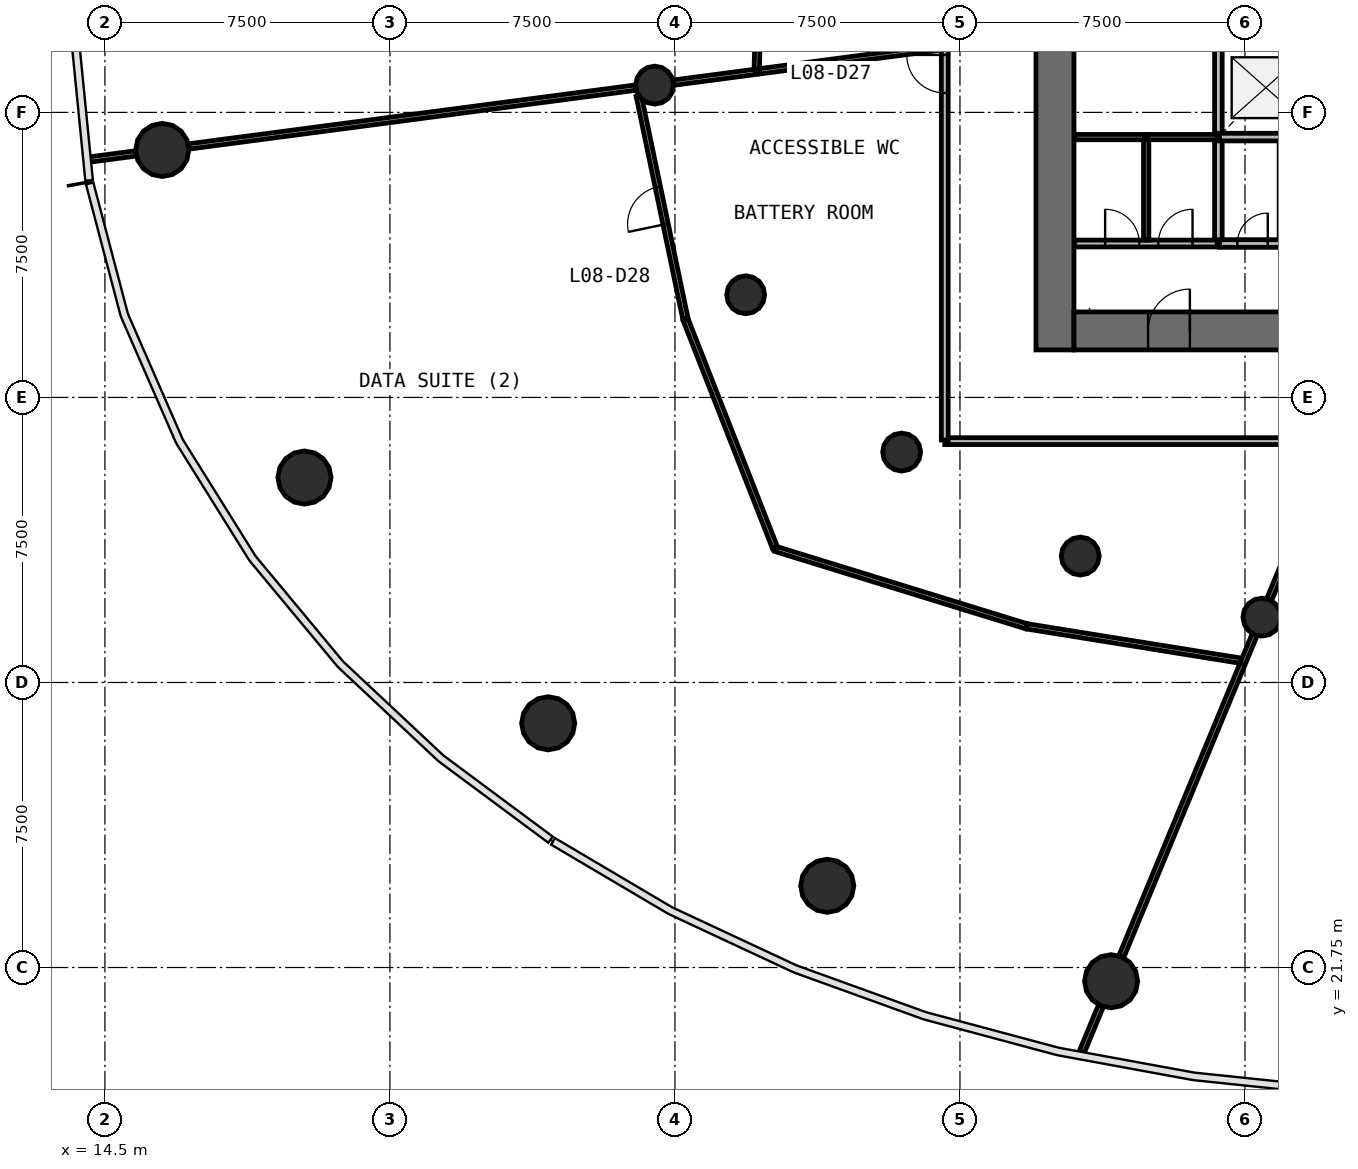
"""IFC4 building model, lengths in metres.
Left out: names, types, materials, properties, quantities, classifications, styles, units other than length and angle.
Written with IfcOpenShell. Run it as: python <this file> out.ifc"""

import sys

from ifc_helpers import new_model, si_unit, direction, frame, frame_2d, origin, origin_2d, place, context, subcontext, project, spatial, rectangle, circle, extrude, source, transform, mapped, element, fill, save


model = new_model("IFC4")
c1 = context("Model", 3, precision=1e-05, world=origin(), true_north=direction((0.0, 1.0)))
c2 = subcontext(c1, "Body", "Model", "MODEL_VIEW")
j1 = project(units=[si_unit("LENGTHUNIT", "METRE"), si_unit("PLANEANGLEUNIT", "RADIAN")], contexts=[c1])
p1 = place(None, origin())
s1 = spatial("IfcSite", under=j1, at=p1, CompositionType="ELEMENT")
p2 = place(p1, origin())
s2 = spatial("IfcBuilding", under=s1, at=p2, CompositionType="ELEMENT")
p3 = place(p2, frame((0.0, 0.0, 35.8)))
s3 = spatial("IfcBuildingStorey", under=s2, at=p3, CompositionType="ELEMENT", Elevation=35.8)
p4 = place(p3, frame((39.5, 58.0, 0.0), z_axis=(0.0, 0.0, 1.0), x_axis=(0.0, -1.0, 0.0)))
e1 = element("IfcWall", 1, at=p4, inside=s3, PredefinedType="SHEAR", context=c2, shape_type="SweptSolid", body=[
    extrude(rectangle(XDim=20.0, YDim=1.0, at=frame_2d((10.0, 0.0))), origin(), (0.0, 0.0, 1.0), 4.4),
])
p5 = place(p4, frame((9.1, 0.0, 0.0)))
e2 = element("IfcOpeningElement", 2, at=p5, cuts=e1, PredefinedType="OPENING", context=c2, shape_type="SweptSolid", body=[
    extrude(rectangle(XDim=1.8, YDim=2.1, at=frame_2d((0.9, 1.05))), frame((0.0, 0.51, 0.0), z_axis=(0.0, -1.0, 0.0), x_axis=(1.0, 0.0, 0.0)), (0.0, 0.0, 1.0), 1.02),
])
p6 = place(p3, frame((40.0, 38.5, 0.0), z_axis=(0.0, 0.0, 1.0), x_axis=(1.0, 0.0, 0.0)))
e3 = element("IfcWall", 3, at=p6, inside=s3, PredefinedType="SHEAR", context=c2, shape_type="SweptSolid", body=[
    extrude(rectangle(XDim=24.0, YDim=1.0, at=frame_2d((12.0, 0.0))), origin(), (0.0, 0.0, 1.0), 4.4),
])
p7 = place(p6, frame((21.45, 0.0, 0.0)))
e4 = element("IfcOpeningElement", 4, at=p7, cuts=e3, PredefinedType="OPENING", context=c2, shape_type="SweptSolid", body=[
    extrude(rectangle(XDim=1.1, YDim=2.1, at=frame_2d((0.55, 1.05))), frame((0.0, 0.51, 0.0), z_axis=(0.0, -1.0, 0.0), x_axis=(1.0, 0.0, 0.0)), (0.0, 0.0, 1.0), 1.02),
])
p8 = place(p6, frame((1.95, 0.0, 0.0)))
e5 = element("IfcOpeningElement", 5, at=p8, cuts=e3, PredefinedType="OPENING", context=c2, shape_type="SweptSolid", body=[
    extrude(rectangle(XDim=1.1, YDim=2.1, at=frame_2d((0.55, 1.05))), frame((0.0, 0.51, 0.0), z_axis=(0.0, -1.0, 0.0), x_axis=(1.0, 0.0, 0.0)), (0.0, 0.0, 1.0), 1.02),
])
m1 = source(origin(), c2, "Body", "SweptSolid", [
    extrude(circle(Radius=0.7, at=origin_2d()), origin(), (0.0, 0.0, 1.0), 4.4),
])
for number, where, z_axis, x_axis in (
    (6, (16.01, 43.262, 0.0), (0.0, 0.0, 1.0), (1.0, 0.0, 0.0)),
    (7, (19.751, 34.642, 0.0), (0.0, 0.0, 1.0), (1.0, 0.0, 0.0)),
    (8, (26.164, 28.176, 0.0), (0.0, 0.0, 1.0), (1.0, 0.0, 0.0)),
    (9, (33.508, 23.9, 0.0), (0.0, 0.0, 1.0), (1.0, 0.0, 0.0)),
    (10, (40.977, 21.389, 0.0), (0.0, 0.0, 1.0), (1.0, 0.0, 0.0)),
):
    element("IfcColumn", number, at=place(p3, frame(where, z_axis=z_axis, x_axis=x_axis)), inside=s3, PredefinedType="COLUMN", context=c2, shape_type="MappedRepresentation", body=[
        mapped(m1, transform((0.0, 0.0, 0.0), scale=1.0)),
    ])
m2 = source(origin(), c2, "Body", "SweptSolid", [
    extrude(circle(Radius=0.5, at=origin_2d()), origin(), (0.0, 0.0, 1.0), 4.4),
])
for number, where, z_axis, x_axis in (
    (11, (28.966, 44.968, 0.0), (0.0, 0.0, 1.0), (1.0, 0.0, 0.0)),
    (12, (31.361, 39.451, 0.0), (0.0, 0.0, 1.0), (1.0, 0.0, 0.0)),
    (13, (35.465, 35.312, 0.0), (0.0, 0.0, 1.0), (1.0, 0.0, 0.0)),
    (14, (40.165, 32.576, 0.0), (0.0, 0.0, 1.0), (1.0, 0.0, 0.0)),
    (15, (44.945, 30.969, 0.0), (0.0, 0.0, 1.0), (1.0, 0.0, 0.0)),
):
    element("IfcColumn", number, at=place(p3, frame(where, z_axis=z_axis, x_axis=x_axis)), inside=s3, PredefinedType="COLUMN", context=c2, shape_type="MappedRepresentation", body=[
        mapped(m2, transform((0.0, 0.0, 0.0), scale=1.0)),
    ])
p9 = place(p3, frame((43.8, 43.6, 0.0), z_axis=(0.0, 0.0, 1.0), x_axis=(0.0, -1.0, 0.0)))
e16 = element("IfcWall", 16, at=p9, inside=s3, PredefinedType="SOLIDWALL", context=c2, shape_type="SweptSolid", body=[
    extrude(rectangle(XDim=2.8, YDim=0.2, at=frame_2d((1.4, 0.0))), origin(), (0.0, 0.0, 1.0), 3.95),
])
p10 = place(p3, frame((43.8, 45.99, 0.0), z_axis=(0.0, 0.0, 1.0), x_axis=(0.0, -1.0, 0.0)))
e17 = element("IfcWall", 17, at=p10, inside=s3, PredefinedType="SOLIDWALL", context=c2, shape_type="SweptSolid", body=[
    extrude(rectangle(XDim=2.36, YDim=0.2, at=frame_2d((1.18, 0.0))), origin(), (0.0, 0.0, 1.0), 3.95),
])
p11 = place(p3, frame((43.83, 43.6, 0.0), z_axis=(0.0, 0.0, 1.0), x_axis=(1.0, 0.0, 0.0)))
e18 = element("IfcWall", 18, at=p11, inside=s3, PredefinedType="SOLIDWALL", context=c2, shape_type="SweptSolid", body=[
    extrude(rectangle(XDim=1.64, YDim=0.2, at=frame_2d((0.82, 0.0))), origin(), (0.0, 0.0, 1.0), 3.95),
])
p12 = place(p3, frame((43.83, 40.8, 0.0), z_axis=(0.0, 0.0, 1.0), x_axis=(1.0, 0.0, 0.0)))
e19 = element("IfcWall", 19, at=p12, inside=s3, PredefinedType="SOLIDWALL", context=c2, shape_type="SweptSolid", body=[
    extrude(rectangle(XDim=1.64, YDim=0.2, at=frame_2d((0.82, 0.0))), origin(), (0.0, 0.0, 1.0), 3.95),
])
p13 = place(p12, frame((0.47, 0.0, 0.0)))
e20 = element("IfcOpeningElement", 20, at=p13, cuts=e19, PredefinedType="OPENING", context=c2, shape_type="SweptSolid", body=[
    extrude(rectangle(XDim=0.8, YDim=2.1, at=frame_2d((0.4, 1.05))), frame((0.0, 0.11, 0.0), z_axis=(0.0, -1.0, 0.0), x_axis=(1.0, 0.0, 0.0)), (0.0, 0.0, 1.0), 0.22),
])
p14 = place(p3, frame((67.4, 35.6, 0.0), z_axis=(0.0, 0.0, 1.0), x_axis=(-1.0, 0.0, 0.0)))
e21 = element("IfcWall", 21, at=p14, inside=s3, PredefinedType="PARTITIONING", context=c2, shape_type="SweptSolid", body=[
    extrude(rectangle(XDim=30.8, YDim=0.18, at=frame_2d((15.4, 0.0))), origin(), (0.0, 0.0, 1.0), 3.05),
])
p15 = place(p14, frame((14.95, 0.0, 0.0)))
e22 = element("IfcOpeningElement", 22, at=p15, cuts=e21, PredefinedType="OPENING", context=c2, shape_type="SweptSolid", body=[
    extrude(rectangle(XDim=1.0, YDim=2.1, at=frame_2d((0.5, 1.05))), frame((0.0, 0.1, 0.0), z_axis=(0.0, -1.0, 0.0), x_axis=(1.0, 0.0, 0.0)), (0.0, 0.0, 1.0), 0.2),
])
p16 = place(p14, frame((12.55, 0.0, 0.0)))
e23 = element("IfcOpeningElement", 23, at=p16, cuts=e21, PredefinedType="OPENING", context=c2, shape_type="SweptSolid", body=[
    extrude(rectangle(XDim=1.0, YDim=2.1, at=frame_2d((0.5, 1.05))), frame((0.0, 0.1, 0.0), z_axis=(0.0, -1.0, 0.0), x_axis=(1.0, 0.0, 0.0)), (0.0, 0.0, 1.0), 0.2),
])
p17 = place(p3, frame((36.6, 35.63, 0.0), z_axis=(0.0, 0.0, 1.0), x_axis=(0.0, 1.0, 0.0)))
e24 = element("IfcWall", 24, at=p17, inside=s3, PredefinedType="PARTITIONING", context=c2, shape_type="SweptSolid", body=[
    extrude(rectangle(XDim=23.583, YDim=0.18, at=frame_2d((11.791, 0.0))), origin(), (0.0, 0.0, 1.0), 3.05),
])
p18 = place(p17, frame((16.032, 0.0, 0.0)))
e25 = element("IfcOpeningElement", 25, at=p18, cuts=e24, PredefinedType="OPENING", context=c2, shape_type="SweptSolid", body=[
    extrude(rectangle(XDim=0.9, YDim=2.1, at=frame_2d((0.45, 1.05))), frame((0.0, 0.1, 0.0), z_axis=(0.0, -1.0, 0.0), x_axis=(1.0, 0.0, 0.0)), (0.0, 0.0, 1.0), 0.2),
])
p19 = place(p17, frame((13.232, 0.0, 0.0)))
e26 = element("IfcOpeningElement", 26, at=p19, cuts=e24, PredefinedType="OPENING", context=c2, shape_type="SweptSolid", body=[
    extrude(rectangle(XDim=0.9, YDim=2.1, at=frame_2d((0.45, 1.05))), frame((0.0, 0.1, 0.0), z_axis=(0.0, -1.0, 0.0), x_axis=(1.0, 0.0, 0.0)), (0.0, 0.0, 1.0), 0.2),
])
p20 = place(p17, frame((11.433, 0.0, 0.0)))
e27 = element("IfcOpeningElement", 27, at=p20, cuts=e24, PredefinedType="OPENING", context=c2, shape_type="SweptSolid", body=[
    extrude(rectangle(XDim=0.9, YDim=2.1, at=frame_2d((0.45, 1.05))), frame((0.0, 0.1, 0.0), z_axis=(0.0, -1.0, 0.0), x_axis=(1.0, 0.0, 0.0)), (0.0, 0.0, 1.0), 0.2),
])
p21 = place(p17, frame((9.133, 0.0, 0.0)))
e28 = element("IfcOpeningElement", 28, at=p21, cuts=e24, PredefinedType="OPENING", context=c2, shape_type="SweptSolid", body=[
    extrude(rectangle(XDim=1.0, YDim=2.1, at=frame_2d((0.5, 1.05))), frame((0.0, 0.1, 0.0), z_axis=(0.0, -1.0, 0.0), x_axis=(1.0, 0.0, 0.0)), (0.0, 0.0, 1.0), 0.2),
])
p22 = place(p17, frame((19.133, 0.0, 0.0)))
e29 = element("IfcOpeningElement", 29, at=p22, cuts=e24, PredefinedType="OPENING", context=c2, shape_type="SweptSolid", body=[
    extrude(rectangle(XDim=1.0, YDim=2.1, at=frame_2d((0.5, 1.05))), frame((0.0, 0.1, 0.0), z_axis=(0.0, -1.0, 0.0), x_axis=(1.0, 0.0, 0.0)), (0.0, 0.0, 1.0), 0.2),
])
p23 = place(p3, frame((40.02, 40.8, 0.0), z_axis=(0.0, 0.0, 1.0), x_axis=(1.0, 0.0, 0.0)))
e30 = element("IfcWall", 30, at=p23, inside=s3, PredefinedType="PARTITIONING", context=c2, shape_type="SweptSolid", body=[
    extrude(rectangle(XDim=3.75, YDim=0.18, at=frame_2d((1.875, 0.0))), origin(), (0.0, 0.0, 1.0), 3.95),
])
p24 = place(p23, frame((0.8, 0.0, 0.0)))
e31 = element("IfcOpeningElement", 31, at=p24, cuts=e30, PredefinedType="OPENING", context=c2, shape_type="SweptSolid", body=[
    extrude(rectangle(XDim=0.9, YDim=2.1, at=frame_2d((0.45, 1.05))), frame((0.0, 0.1, 0.0), z_axis=(0.0, -1.0, 0.0), x_axis=(1.0, 0.0, 0.0)), (0.0, 0.0, 1.0), 0.2),
])
p25 = place(p23, frame((2.2, 0.0, 0.0)))
e32 = element("IfcOpeningElement", 32, at=p25, cuts=e30, PredefinedType="OPENING", context=c2, shape_type="SweptSolid", body=[
    extrude(rectangle(XDim=0.9, YDim=2.1, at=frame_2d((0.45, 1.05))), frame((0.0, 0.1, 0.0), z_axis=(0.0, -1.0, 0.0), x_axis=(1.0, 0.0, 0.0)), (0.0, 0.0, 1.0), 0.2),
])
p26 = place(p3, frame((28.466, 44.902, 0.0), z_axis=(0.0, 0.0, 1.0), x_axis=(-0.991446586451, -0.130513088287, 0.0)))
e33 = element("IfcWall", 33, at=p26, inside=s3, PredefinedType="PARTITIONING", context=c2, shape_type="SweptSolid", body=[
    extrude(rectangle(XDim=11.86, YDim=0.14, at=frame_2d((5.93, 0.0))), origin(), (0.0, 0.0, 1.0), 3.05),
])
p27 = place(p3, frame((41.247, 22.04, 0.0), z_axis=(0.0, 0.0, 1.0), x_axis=(0.382672728165, 0.923883966264, 0.0)))
e34 = element("IfcWall", 34, at=p27, inside=s3, PredefinedType="PARTITIONING", context=c2, shape_type="SweptSolid", body=[
    extrude(rectangle(XDim=9.16, YDim=0.14, at=frame_2d((4.58, 0.0))), origin(), (0.0, 0.0, 1.0), 3.05),
])
p28 = place(p3, frame((32.145, 32.764, 0.0), z_axis=(0.0, 0.0, 1.0), x_axis=(0.955628382182, -0.294574939816, 0.0)))
e35 = element("IfcWall", 35, at=p28, inside=s3, PredefinedType="PARTITIONING", context=c2, shape_type="SweptSolid", body=[
    extrude(rectangle(XDim=6.91, YDim=0.14, at=frame_2d((3.455, 0.0))), origin(), (0.0, 0.0, 1.0), 3.05),
])
p29 = place(p3, frame((29.78, 38.796, 0.0), z_axis=(0.0, 0.0, 1.0), x_axis=(0.364958848298, -0.931023651176, 0.0)))
e36 = element("IfcWall", 36, at=p29, inside=s3, PredefinedType="PARTITIONING", context=c2, shape_type="SweptSolid", body=[
    extrude(rectangle(XDim=6.449, YDim=0.14, at=frame_2d((3.224, 0.0))), origin(), (0.0, 0.0, 1.0), 3.05),
])
p30 = place(p3, frame((29.774, 38.826, 0.0), z_axis=(0.0, 0.0, 1.0), x_axis=(-0.20499122911, 0.978763810113, 0.0)))
e37 = element("IfcWall", 37, at=p30, inside=s3, PredefinedType="PARTITIONING", context=c2, shape_type="SweptSolid", body=[
    extrude(rectangle(XDim=5.988, YDim=0.14, at=frame_2d((2.994, 0.0))), origin(), (0.0, 0.0, 1.0), 3.05),
])
p31 = place(p30, frame((2.538, 0.0, 0.0)))
e38 = element("IfcOpeningElement", 38, at=p31, cuts=e37, PredefinedType="OPENING", context=c2, shape_type="SweptSolid", body=[
    extrude(rectangle(XDim=1.0, YDim=2.1, at=frame_2d((0.5, 1.05))), frame((0.0, 0.08, 0.0), z_axis=(0.0, -1.0, 0.0), x_axis=(1.0, 0.0, 0.0)), (0.0, 0.0, 1.0), 0.16),
])
p32 = place(p3, frame((38.777, 30.724, 0.0), z_axis=(0.0, 0.0, 1.0), x_axis=(0.987350770866, -0.158551112488, 0.0)))
e39 = element("IfcWall", 39, at=p32, inside=s3, PredefinedType="PARTITIONING", context=c2, shape_type="SweptSolid", body=[
    extrude(rectangle(XDim=5.69, YDim=0.14, at=frame_2d((2.845, 0.0))), origin(), (0.0, 0.0, 1.0), 3.05),
])
p33 = place(p3, frame((31.793, 50.66, 0.0), z_axis=(0.0, 0.0, 1.0), x_axis=(-0.026785082404, -0.999641215317, 0.0)))
e40 = element("IfcWall", 40, at=p33, inside=s3, PredefinedType="PARTITIONING", context=c2, shape_type="SweptSolid", body=[
    extrude(rectangle(XDim=5.341, YDim=0.14, at=frame_2d((2.671, 0.0))), origin(), (0.0, 0.0, 1.0), 3.05),
])
p34 = place(p3, frame((36.51, 45.961, 0.0), z_axis=(0.0, 0.0, 1.0), x_axis=(-0.991443283178, -0.130538179246, 0.0)))
e41 = element("IfcWall", 41, at=p34, inside=s3, PredefinedType="PARTITIONING", context=c2, shape_type="SweptSolid", body=[
    extrude(rectangle(XDim=4.831, YDim=0.14, at=frame_2d((2.416, 0.0))), origin(), (0.0, 0.0, 1.0), 3.05),
])
p35 = place(p3, frame((46.826, 35.51, 0.0), z_axis=(0.0, 0.0, 1.0), x_axis=(-0.382672831764, -0.923883923353, 0.0)))
e42 = element("IfcWall", 42, at=p35, inside=s3, PredefinedType="PARTITIONING", context=c2, shape_type="SweptSolid", body=[
    extrude(rectangle(XDim=4.41, YDim=0.14, at=frame_2d((2.205, 0.0))), origin(), (0.0, 0.0, 1.0), 3.05),
])
p36 = place(p3, frame((41.9, 40.89, 0.0), z_axis=(0.0, 0.0, 1.0), x_axis=(0.0, 1.0, 0.0)))
e43 = element("IfcWall", 43, at=p36, inside=s3, PredefinedType="PARTITIONING", context=c2, shape_type="SweptSolid", body=[
    extrude(rectangle(XDim=2.71, YDim=0.14, at=frame_2d((1.355, 0.0))), origin(), (0.0, 0.0, 1.0), 3.05),
])
p37 = place(p3, frame((31.621, 45.317, 0.0), z_axis=(0.0, 0.0, 1.0), x_axis=(-0.991455060392, -0.130448699582, 0.0)))
e44 = element("IfcWall", 44, at=p37, inside=s3, PredefinedType="PARTITIONING", context=c2, shape_type="SweptSolid", body=[
    extrude(rectangle(XDim=2.173, YDim=0.14, at=frame_2d((1.086, 0.0))), origin(), (0.0, 0.0, 1.0), 3.05),
])
p38 = place(p3, frame((43.77, 43.6, 0.0), z_axis=(0.0, 0.0, 1.0), x_axis=(-1.0, 0.0, 0.0)))
e45 = element("IfcWall", 45, at=p38, inside=s3, PredefinedType="PARTITIONING", context=c2, shape_type="SweptSolid", body=[
    extrude(rectangle(XDim=1.84, YDim=0.14, at=frame_2d((0.92, 0.0))), origin(), (0.0, 0.0, 1.0), 3.05),
])
p39 = place(p3, frame((41.87, 43.6, 0.0), z_axis=(0.0, 0.0, 1.0), x_axis=(-1.0, 0.0, 0.0)))
e46 = element("IfcWall", 46, at=p39, inside=s3, PredefinedType="PARTITIONING", context=c2, shape_type="SweptSolid", body=[
    extrude(rectangle(XDim=1.85, YDim=0.14, at=frame_2d((0.925, 0.0))), origin(), (0.0, 0.0, 1.0), 3.05),
])
p40 = place(p3, frame((40.708, 20.737, 0.0), z_axis=(0.0, 0.0, 1.0), x_axis=(-0.382814774468, -0.923825117892, 0.0)))
e47 = element("IfcWall", 47, at=p40, inside=s3, PredefinedType="PARTITIONING", context=c2, shape_type="SweptSolid", body=[
    extrude(rectangle(XDim=1.32, YDim=0.14, at=frame_2d((0.66, 0.0))), origin(), (0.0, 0.0, 1.0), 3.05),
])
p41 = place(p3, frame((15.311, 43.17, 0.0), z_axis=(0.0, 0.0, 1.0), x_axis=(-0.991431129538, -0.130630453508, 0.0)))
e48 = element("IfcWall", 48, at=p41, inside=s3, PredefinedType="PARTITIONING", context=c2, shape_type="SweptSolid", body=[
    extrude(rectangle(XDim=1.22, YDim=0.14, at=frame_2d((0.61, 0.0))), origin(), (0.0, 0.0, 1.0), 3.05),
])
m3 = source(origin(), c2, "Body", "SweptSolid", [
    extrude(rectangle(XDim=0.8, YDim=2.1, at=frame_2d((0.4, 1.05))), frame((0.0, 0.025, 0.0), z_axis=(0.0, -1.0, 0.0), x_axis=(1.0, 0.0, 0.0)), (0.0, 0.0, 1.0), 0.05),
])
p42 = place(p13, origin())
e49 = element("IfcDoor", 49, at=p42, inside=s3, OperationType="SINGLE_SWING_RIGHT", PredefinedType="DOOR", context=c2, shape_type="MappedRepresentation", body=[
    mapped(m3, transform((0.0, 0.0, 0.0), scale=1.0)),
])
fill(e20, e49)
m4 = source(origin(), c2, "Body", "SweptSolid", [
    extrude(rectangle(XDim=1.1, YDim=2.1, at=frame_2d((0.55, 1.05))), frame((0.0, 0.025, 0.0), z_axis=(0.0, -1.0, 0.0), x_axis=(1.0, 0.0, 0.0)), (0.0, 0.0, 1.0), 0.05),
])
p43 = place(p8, origin())
e50 = element("IfcDoor", 50, at=p43, inside=s3, OperationType="SINGLE_SWING_RIGHT", PredefinedType="DOOR", context=c2, shape_type="MappedRepresentation", body=[
    mapped(m4, transform((0.0, 0.0, 0.0), scale=1.0)),
])
fill(e5, e50)
m5 = source(origin(), c2, "Body", "SweptSolid", [
    extrude(rectangle(XDim=1.0, YDim=2.1, at=frame_2d((0.5, 1.05))), frame((0.0, 0.025, 0.0), z_axis=(0.0, -1.0, 0.0), x_axis=(1.0, 0.0, 0.0)), (0.0, 0.0, 1.0), 0.05),
])
p44 = place(p21, origin())
e51 = element("IfcDoor", 51, at=p44, inside=s3, OperationType="SINGLE_SWING_RIGHT", PredefinedType="DOOR", context=c2, shape_type="MappedRepresentation", body=[
    mapped(m5, transform((0.0, 0.0, 0.0), scale=1.0)),
])
fill(e28, e51)
p45 = place(p31, origin())
e52 = element("IfcDoor", 52, at=p45, inside=s3, OperationType="SINGLE_SWING_LEFT", PredefinedType="DOOR", context=c2, shape_type="MappedRepresentation", body=[
    mapped(m5, transform((0.0, 0.0, 0.0), scale=1.0)),
])
fill(e38, e52)
m6 = source(origin(), c2, "Body", "SweptSolid", [
    extrude(rectangle(XDim=0.9, YDim=2.1, at=frame_2d((0.45, 1.05))), frame((0.0, 0.025, 0.0), z_axis=(0.0, -1.0, 0.0), x_axis=(1.0, 0.0, 0.0)), (0.0, 0.0, 1.0), 0.05),
])
p46 = place(p24, origin())
e53 = element("IfcDoor", 53, at=p46, inside=s3, OperationType="SINGLE_SWING_LEFT", PredefinedType="DOOR", context=c2, shape_type="MappedRepresentation", body=[
    mapped(m6, transform((0.0, 0.0, 0.0), scale=1.0)),
])
fill(e31, e53)
p47 = place(p25, origin())
e54 = element("IfcDoor", 54, at=p47, inside=s3, OperationType="SINGLE_SWING_RIGHT", PredefinedType="DOOR", context=c2, shape_type="MappedRepresentation", body=[
    mapped(m6, transform((0.0, 0.0, 0.0), scale=1.0)),
])
fill(e32, e54)
save(model, sys.argv[1])
